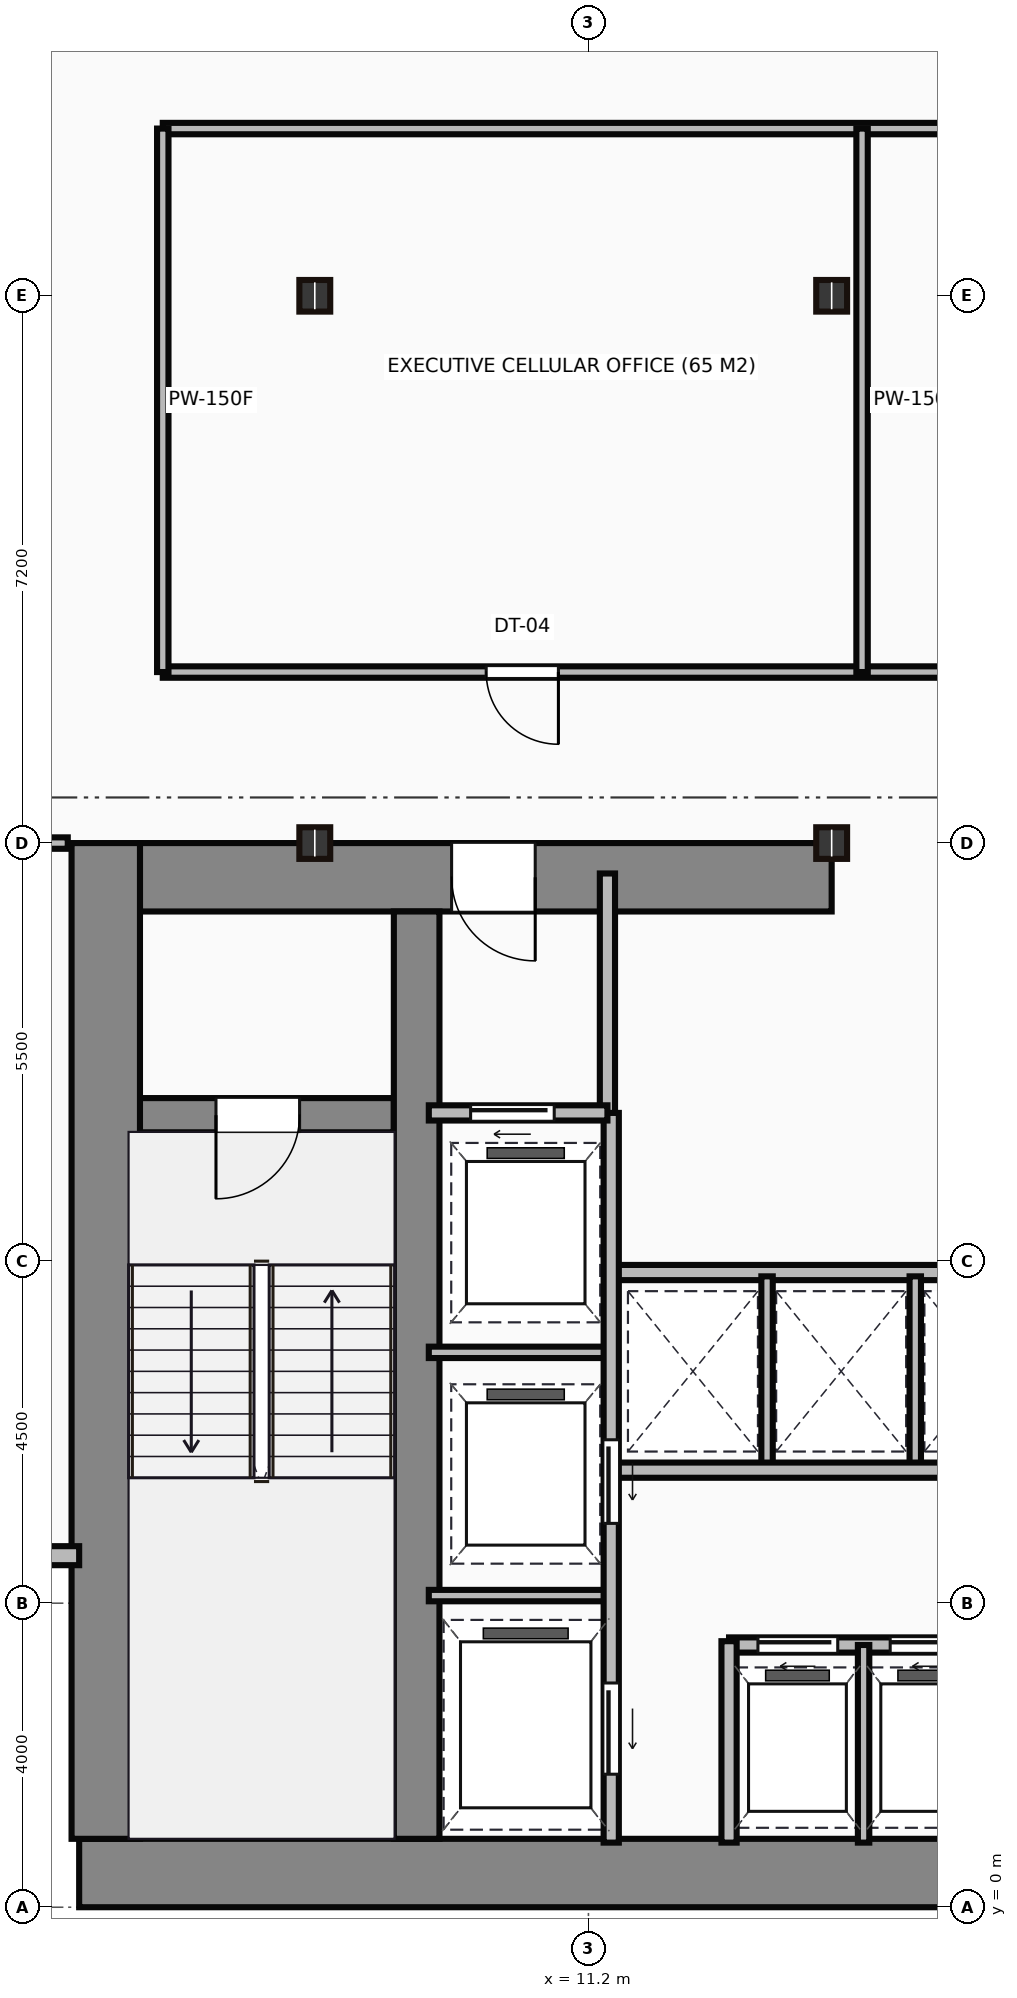
"""IFC4 building model, lengths in metres.
Left out: names, types, materials, properties, quantities, classifications, styles, units other than length and angle.
Written with IfcOpenShell. Run it as: python <this file> out.ifc"""

import sys

from ifc_helpers import new_model, si_unit, direction, frame, frame_2d, origin, origin_2d, place, context, subcontext, project, spatial, rectangle, i_section, extrude, source, transform, mapped, element, fill, save


model = new_model("IFC4")
c1 = context("Model", 3, precision=1e-05, world=origin(), true_north=direction((0.0, 1.0)))
c2 = subcontext(c1, "Body", "Model", "MODEL_VIEW")
j1 = project(units=[si_unit("LENGTHUNIT", "METRE"), si_unit("PLANEANGLEUNIT", "RADIAN")], contexts=[c1])
p1 = place(None, origin())
s1 = spatial("IfcSite", under=j1, at=p1, CompositionType="ELEMENT")
p2 = place(p1, origin())
s2 = spatial("IfcBuilding", under=s1, at=p2, CompositionType="ELEMENT")
p3 = place(p2, frame((0.0, 0.0, 50.75)))
s3 = spatial("IfcBuildingStorey", under=s2, at=p3, CompositionType="ELEMENT", Elevation=50.75)
m1 = source(origin(), c2, "Body", "SweptSolid", [
    extrude(rectangle(XDim=29.5, YDim=0.9, at=frame_2d((14.75, 0.0))), origin(), (0.0, 0.0, 1.0), 3.65),
])
p4 = place(p3, frame((4.5, 0.45, 0.0), z_axis=(0.0, 0.0, 1.0), x_axis=(1.0, 0.0, 0.0)))
e1 = element("IfcWall", 1, at=p4, inside=s3, PredefinedType="SHEAR", context=c2, shape_type="MappedRepresentation", body=[
    mapped(m1, transform((0.0, 0.0, 0.0))),
])
m2 = source(origin(), c2, "Body", "SweptSolid", [
    extrude(rectangle(XDim=13.1, YDim=0.9, at=frame_2d((6.55, 0.0))), origin(), (0.0, 0.0, 1.0), 3.65),
])
p5 = place(p3, frame((4.85, 0.9, 0.0), z_axis=(0.0, 0.0, 1.0), x_axis=(0.0, 1.0, 0.0)))
e2 = element("IfcWall", 2, at=p5, inside=s3, PredefinedType="SHEAR", context=c2, shape_type="MappedRepresentation", body=[
    mapped(m2, transform((0.0, 0.0, 0.0))),
])
m3 = source(origin(), c2, "Body", "SweptSolid", [
    extrude(rectangle(XDim=9.1, YDim=0.9, at=frame_2d((4.55, 0.0))), origin(), (0.0, 0.0, 1.0), 3.65),
])
p6 = place(p3, frame((5.3, 13.55, 0.0), z_axis=(0.0, 0.0, 1.0), x_axis=(1.0, 0.0, 0.0)))
e3 = element("IfcWall", 3, at=p6, inside=s3, PredefinedType="SHEAR", context=c2, shape_type="MappedRepresentation", body=[
    mapped(m3, transform((0.0, 0.0, 0.0))),
])
p7 = place(p6, frame((4.1, 0.0, 0.0)))
e4 = element("IfcOpeningElement", 4, at=p7, cuts=e3, PredefinedType="OPENING", context=c2, shape_type="SweptSolid", body=[
    extrude(rectangle(XDim=1.1, YDim=2.15, at=frame_2d((0.55, 1.075))), frame((0.0, 0.46, 0.0), z_axis=(0.0, -1.0, 0.0), x_axis=(1.0, 0.0, 0.0)), (0.0, 0.0, 1.0), 0.92),
])
m4 = source(origin(), c2, "Body", "SweptSolid", [
    extrude(rectangle(XDim=12.2, YDim=0.6, at=frame_2d((6.1, 0.0))), origin(), (0.0, 0.0, 1.0), 3.65),
])
p8 = place(p3, frame((8.94, 0.9, 0.0), z_axis=(0.0, 0.0, 1.0), x_axis=(0.0, 1.0, 0.0)))
e5 = element("IfcWall", 5, at=p8, inside=s3, PredefinedType="SHEAR", context=c2, shape_type="MappedRepresentation", body=[
    mapped(m4, transform((0.0, 0.0, 0.0))),
])
m5 = source(origin(), c2, "Body", "SweptSolid", [
    extrude(rectangle(XDim=3.39, YDim=0.45, at=frame_2d((1.695, 0.0))), origin(), (0.0, 0.0, 1.0), 3.65),
])
p9 = place(p3, frame((5.25, 10.42, 0.0), z_axis=(0.0, 0.0, 1.0), x_axis=(1.0, 0.0, 0.0)))
e6 = element("IfcWall", 6, at=p9, inside=s3, PredefinedType="SHEAR", context=c2, shape_type="MappedRepresentation", body=[
    mapped(m5, transform((0.0, 0.0, 0.0))),
])
p10 = place(p9, frame((1.05, 0.0, 0.0)))
e7 = element("IfcOpeningElement", 7, at=p10, cuts=e6, PredefinedType="OPENING", context=c2, shape_type="SweptSolid", body=[
    extrude(rectangle(XDim=1.1, YDim=2.15, at=frame_2d((0.55, 1.075))), frame((0.0, 0.235, 0.0), z_axis=(0.0, -1.0, 0.0), x_axis=(1.0, 0.0, 0.0)), (0.0, 0.0, 1.0), 0.47),
])
m6 = source(origin(), c2, "Body", "SweptSolid", [
    extrude(i_section(OverallWidth=0.406, OverallDepth=0.416, WebThickness=0.03, FlangeThickness=0.048, at=origin_2d()), origin(), (0.0, 0.0, 1.0), 3.65),
])
for number, where, z_axis, x_axis in (
    (8, (7.6, 14.0, 0.0), (0.0, 0.0, 1.0), (1.0, 0.0, 0.0)),
    (9, (7.6, 21.2, 0.0), (0.0, 0.0, 1.0), (1.0, 0.0, 0.0)),
    (10, (14.4, 14.0, 0.0), (0.0, 0.0, 1.0), (1.0, 0.0, 0.0)),
    (11, (14.4, 21.2, 0.0), (0.0, 0.0, 1.0), (1.0, 0.0, 0.0)),
):
    element("IfcColumn", number, at=place(p3, frame(where, z_axis=z_axis, x_axis=x_axis)), inside=s3, PredefinedType="COLUMN", context=c2, shape_type="MappedRepresentation", body=[
        mapped(m6, transform((0.0, 0.0, 0.0))),
    ])
m7 = source(origin(), c2, "Body", "SweptSolid", [
    extrude(rectangle(XDim=4.5, YDim=0.25, at=frame_2d((2.25, 0.0))), origin(), (0.0, 0.0, 1.0), 3.4),
])
p11 = place(p3, frame((0.0, 4.625, 0.0), z_axis=(0.0, 0.0, 1.0), x_axis=(1.0, 0.0, 0.0)))
e12 = element("IfcWall", 12, at=p11, inside=s3, PredefinedType="STANDARD", context=c2, shape_type="MappedRepresentation", body=[
    mapped(m7, transform((0.0, 0.0, 0.0))),
])
m8 = source(origin(), c2, "Body", "SweptSolid", [
    extrude(rectangle(XDim=3.18, YDim=0.2, at=frame_2d((1.59, 0.0))), origin(), (0.0, 0.0, 1.0), 3.4),
])
p12 = place(p3, frame((11.45, 10.42, 0.0), z_axis=(0.0, 0.0, 1.0), x_axis=(0.0, 1.0, 0.0)))
e13 = element("IfcWall", 13, at=p12, inside=s3, PredefinedType="PARTITIONING", context=c2, shape_type="MappedRepresentation", body=[
    mapped(m8, transform((0.0, 0.0, 0.0))),
])
m9 = source(origin(), c2, "Body", "SweptSolid", [
    extrude(rectangle(XDim=2.35, YDim=0.2, at=frame_2d((1.175, 0.0))), origin(), (0.0, 0.0, 1.0), 3.4),
])
p13 = place(p3, frame((9.1, 10.45, 0.0), z_axis=(0.0, 0.0, 1.0), x_axis=(1.0, 0.0, 0.0)))
e14 = element("IfcWall", 14, at=p13, inside=s3, PredefinedType="PARTITIONING", context=c2, shape_type="MappedRepresentation", body=[
    mapped(m9, transform((0.0, 0.0, 0.0))),
])
p14 = place(p13, frame((0.55, 0.0, 0.0)))
e15 = element("IfcOpeningElement", 15, at=p14, cuts=e14, PredefinedType="OPENING", context=c2, shape_type="SweptSolid", body=[
    extrude(rectangle(XDim=1.1, YDim=2.15, at=frame_2d((0.55, 1.075))), frame((0.0, 0.11, 0.0), z_axis=(0.0, -1.0, 0.0), x_axis=(1.0, 0.0, 0.0)), (0.0, 0.0, 1.0), 0.22),
])
m10 = source(origin(), c2, "Body", "SweptSolid", [
    extrude(rectangle(XDim=9.6, YDim=0.2, at=frame_2d((4.8, 0.0))), origin(), (0.0, 0.0, 1.0), 3.4),
])
p15 = place(p3, frame((11.5, 0.85, 0.0), z_axis=(0.0, 0.0, 1.0), x_axis=(0.0, 1.0, 0.0)))
e16 = element("IfcWall", 16, at=p15, inside=s3, PredefinedType="PARTITIONING", context=c2, shape_type="MappedRepresentation", body=[
    mapped(m10, transform((0.0, 0.0, 0.0))),
])
p16 = place(p15, frame((4.2, 0.0, 0.0)))
e17 = element("IfcOpeningElement", 17, at=p16, cuts=e16, PredefinedType="OPENING", context=c2, shape_type="SweptSolid", body=[
    extrude(rectangle(XDim=1.1, YDim=2.15, at=frame_2d((0.55, 1.075))), frame((0.0, 0.11, 0.0), z_axis=(0.0, -1.0, 0.0), x_axis=(1.0, 0.0, 0.0)), (0.0, 0.0, 1.0), 0.22),
])
p17 = place(p15, frame((0.9, 0.0, 0.0)))
e18 = element("IfcOpeningElement", 18, at=p17, cuts=e16, PredefinedType="OPENING", context=c2, shape_type="SweptSolid", body=[
    extrude(rectangle(XDim=1.2, YDim=2.15, at=frame_2d((0.6, 1.075))), frame((0.0, 0.11, 0.0), z_axis=(0.0, -1.0, 0.0), x_axis=(1.0, 0.0, 0.0)), (0.0, 0.0, 1.0), 0.22),
])
m11 = source(origin(), c2, "Body", "SweptSolid", [
    extrude(rectangle(XDim=2.4, YDim=0.15, at=frame_2d((1.2, 0.0))), origin(), (0.0, 0.0, 1.0), 3.4),
])
for number, where, z_axis, x_axis in (
    (19, (9.1, 4.1, 0.0), (0.0, 0.0, 1.0), (1.0, 0.0, 0.0)),
    (20, (9.1, 7.3, 0.0), (0.0, 0.0, 1.0), (1.0, 0.0, 0.0)),
):
    element("IfcWall", number, at=place(p3, frame(where, z_axis=z_axis, x_axis=x_axis)), inside=s3, PredefinedType="PARTITIONING", context=c2, shape_type="MappedRepresentation", body=[
        mapped(m11, transform((0.0, 0.0, 0.0))),
    ])
m12 = source(origin(), c2, "Body", "SweptSolid", [
    extrude(rectangle(XDim=2.65, YDim=0.2, at=frame_2d((1.325, 0.0))), origin(), (0.0, 0.0, 1.0), 3.4),
])
p18 = place(p3, frame((13.05, 0.85, 0.0), z_axis=(0.0, 0.0, 1.0), x_axis=(0.0, 1.0, 0.0)))
e21 = element("IfcWall", 21, at=p18, inside=s3, PredefinedType="PARTITIONING", context=c2, shape_type="MappedRepresentation", body=[
    mapped(m12, transform((0.0, 0.0, 0.0))),
])
m13 = source(origin(), c2, "Body", "SweptSolid", [
    extrude(rectangle(XDim=10.5, YDim=0.2, at=frame_2d((5.25, 0.0))), origin(), (0.0, 0.0, 1.0), 3.4),
])
p19 = place(p3, frame((13.05, 3.45, 0.0), z_axis=(0.0, 0.0, 1.0), x_axis=(1.0, 0.0, 0.0)))
e22 = element("IfcWall", 22, at=p19, inside=s3, PredefinedType="PARTITIONING", context=c2, shape_type="MappedRepresentation", body=[
    mapped(m13, transform((0.0, 0.0, 0.0))),
])
p20 = place(p19, frame((0.38, 0.0, 0.0)))
e23 = element("IfcOpeningElement", 23, at=p20, cuts=e22, PredefinedType="OPENING", context=c2, shape_type="SweptSolid", body=[
    extrude(rectangle(XDim=1.05, YDim=2.15, at=frame_2d((0.525, 1.075))), frame((0.0, 0.11, 0.0), z_axis=(0.0, -1.0, 0.0), x_axis=(1.0, 0.0, 0.0)), (0.0, 0.0, 1.0), 0.22),
])
p21 = place(p19, frame((2.12, 0.0, 0.0)))
e24 = element("IfcOpeningElement", 24, at=p21, cuts=e22, PredefinedType="OPENING", context=c2, shape_type="SweptSolid", body=[
    extrude(rectangle(XDim=1.05, YDim=2.15, at=frame_2d((0.525, 1.075))), frame((0.0, 0.11, 0.0), z_axis=(0.0, -1.0, 0.0), x_axis=(1.0, 0.0, 0.0)), (0.0, 0.0, 1.0), 0.22),
])
p22 = place(p19, frame((3.86, 0.0, 0.0)))
e25 = element("IfcOpeningElement", 25, at=p22, cuts=e22, PredefinedType="OPENING", context=c2, shape_type="SweptSolid", body=[
    extrude(rectangle(XDim=1.05, YDim=2.15, at=frame_2d((0.525, 1.075))), frame((0.0, 0.11, 0.0), z_axis=(0.0, -1.0, 0.0), x_axis=(1.0, 0.0, 0.0)), (0.0, 0.0, 1.0), 0.22),
])
p23 = place(p19, frame((5.6, 0.0, 0.0)))
e26 = element("IfcOpeningElement", 26, at=p23, cuts=e22, PredefinedType="OPENING", context=c2, shape_type="SweptSolid", body=[
    extrude(rectangle(XDim=1.05, YDim=2.15, at=frame_2d((0.525, 1.075))), frame((0.0, 0.11, 0.0), z_axis=(0.0, -1.0, 0.0), x_axis=(1.0, 0.0, 0.0)), (0.0, 0.0, 1.0), 0.22),
])
p24 = place(p19, frame((7.34, 0.0, 0.0)))
e27 = element("IfcOpeningElement", 27, at=p24, cuts=e22, PredefinedType="OPENING", context=c2, shape_type="SweptSolid", body=[
    extrude(rectangle(XDim=1.05, YDim=2.15, at=frame_2d((0.525, 1.075))), frame((0.0, 0.11, 0.0), z_axis=(0.0, -1.0, 0.0), x_axis=(1.0, 0.0, 0.0)), (0.0, 0.0, 1.0), 0.22),
])
p25 = place(p19, frame((9.08, 0.0, 0.0)))
e28 = element("IfcOpeningElement", 28, at=p25, cuts=e22, PredefinedType="OPENING", context=c2, shape_type="SweptSolid", body=[
    extrude(rectangle(XDim=1.05, YDim=2.15, at=frame_2d((0.525, 1.075))), frame((0.0, 0.11, 0.0), z_axis=(0.0, -1.0, 0.0), x_axis=(1.0, 0.0, 0.0)), (0.0, 0.0, 1.0), 0.22),
])
m14 = source(origin(), c2, "Body", "SweptSolid", [
    extrude(rectangle(XDim=2.6, YDim=0.15, at=frame_2d((1.3, 0.0))), origin(), (0.0, 0.0, 1.0), 3.4),
])
p26 = place(p3, frame((14.82, 0.85, 0.0), z_axis=(0.0, 0.0, 1.0), x_axis=(0.0, 1.0, 0.0)))
e29 = element("IfcWall", 29, at=p26, inside=s3, PredefinedType="PARTITIONING", context=c2, shape_type="MappedRepresentation", body=[
    mapped(m14, transform((0.0, 0.0, 0.0))),
])
m15 = source(origin(), c2, "Body", "SweptSolid", [
    extrude(rectangle(XDim=11.85, YDim=0.2, at=frame_2d((5.925, 0.0))), origin(), (0.0, 0.0, 1.0), 3.4),
])
for number, where, z_axis, x_axis in (
    (30, (11.55, 5.75, 0.0), (0.0, 0.0, 1.0), (1.0, 0.0, 0.0)),
    (31, (11.55, 8.35, 0.0), (0.0, 0.0, 1.0), (1.0, 0.0, 0.0)),
):
    element("IfcWall", number, at=place(p3, frame(where, z_axis=z_axis, x_axis=x_axis)), inside=s3, PredefinedType="PARTITIONING", context=c2, shape_type="MappedRepresentation", body=[
        mapped(m15, transform((0.0, 0.0, 0.0))),
    ])
m16 = source(origin(), c2, "Body", "SweptSolid", [
    extrude(rectangle(XDim=2.5, YDim=0.15, at=frame_2d((1.25, 0.0))), origin(), (0.0, 0.0, 1.0), 3.4),
])
for number, where, z_axis, x_axis in (
    (32, (13.55, 5.8, 0.0), (0.0, 0.0, 1.0), (0.0, 1.0, 0.0)),
    (33, (15.5, 5.8, 0.0), (0.0, 0.0, 1.0), (0.0, 1.0, 0.0)),
):
    element("IfcWall", number, at=place(p3, frame(where, z_axis=z_axis, x_axis=x_axis)), inside=s3, PredefinedType="PARTITIONING", context=c2, shape_type="MappedRepresentation", body=[
        mapped(m16, transform((0.0, 0.0, 0.0))),
    ])
m17 = source(origin(), c2, "Body", "SweptSolid", [
    extrude(rectangle(XDim=0.95, YDim=0.15, at=frame_2d((0.475, 0.0))), origin(), (0.0, 0.0, 1.0), 2.625),
])
p27 = place(p3, frame((4.35, 14.0, 0.0), z_axis=(0.0, 0.0, 1.0), x_axis=(-1.0, 0.0, 0.0)))
e34 = element("IfcWall", 34, at=p27, inside=s3, PredefinedType="PARTITIONING", context=c2, shape_type="MappedRepresentation", body=[
    mapped(m17, transform((0.0, 0.0, 0.0))),
])
m18 = source(origin(), c2, "Body", "SweptSolid", [
    extrude(rectangle(XDim=38.8, YDim=0.15, at=frame_2d((19.4, 0.0))), origin(), (0.0, 0.0, 1.0), 3.4),
])
p28 = place(p3, frame((5.6, 16.25, 0.0), z_axis=(0.0, 0.0, 1.0), x_axis=(1.0, 0.0, 0.0)))
e35 = element("IfcWall", 35, at=p28, inside=s3, PredefinedType="PARTITIONING", context=c2, shape_type="MappedRepresentation", body=[
    mapped(m18, transform((0.0, 0.0, 0.0))),
])
p29 = place(p28, frame((4.255, 0.0, 0.0)))
e36 = element("IfcOpeningElement", 36, at=p29, cuts=e35, PredefinedType="OPENING", context=c2, shape_type="SweptSolid", body=[
    extrude(rectangle(XDim=0.95, YDim=2.15, at=frame_2d((0.475, 1.075))), frame((0.0, 0.085, 0.0), z_axis=(0.0, -1.0, 0.0), x_axis=(1.0, 0.0, 0.0)), (0.0, 0.0, 1.0), 0.17),
])
p30 = place(p28, frame((14.125, 0.0, 0.0)))
e37 = element("IfcOpeningElement", 37, at=p30, cuts=e35, PredefinedType="OPENING", context=c2, shape_type="SweptSolid", body=[
    extrude(rectangle(XDim=0.95, YDim=2.15, at=frame_2d((0.475, 1.075))), frame((0.0, 0.085, 0.0), z_axis=(0.0, -1.0, 0.0), x_axis=(1.0, 0.0, 0.0)), (0.0, 0.0, 1.0), 0.17),
])
m19 = source(origin(), c2, "Body", "SweptSolid", [
    extrude(rectangle(XDim=38.8, YDim=0.15, at=frame_2d((19.4, 0.0))), origin(), (0.0, 0.0, 1.0), 2.978),
])
p31 = place(p3, frame((44.4, 23.4, 0.0), z_axis=(0.0, 0.0, 1.0), x_axis=(-1.0, 0.0, 0.0)))
e38 = element("IfcWall", 38, at=p31, inside=s3, PredefinedType="PARTITIONING", context=c2, shape_type="MappedRepresentation", body=[
    mapped(m19, transform((0.0, 0.0, 0.0))),
])
p32 = place(p31, frame((12.925, 0.0, 0.0)))
e39 = element("IfcOpeningElement", 39, at=p32, cuts=e38, PredefinedType="OPENING", context=c2, shape_type="SweptSolid", body=[
    extrude(rectangle(XDim=0.95, YDim=2.15, at=frame_2d((0.475, 1.075))), frame((0.0, 0.085, 0.0), z_axis=(0.0, -1.0, 0.0), x_axis=(1.0, 0.0, 0.0)), (0.0, 0.0, 1.0), 0.17),
])
p33 = place(p31, frame((3.655, 0.0, 0.0)))
e40 = element("IfcOpeningElement", 40, at=p33, cuts=e38, PredefinedType="OPENING", context=c2, shape_type="SweptSolid", body=[
    extrude(rectangle(XDim=0.95, YDim=2.15, at=frame_2d((0.475, 1.075))), frame((0.0, 0.085, 0.0), z_axis=(0.0, -1.0, 0.0), x_axis=(1.0, 0.0, 0.0)), (0.0, 0.0, 1.0), 0.17),
])
m20 = source(origin(), c2, "Body", "SweptSolid", [
    extrude(rectangle(XDim=7.15, YDim=0.15, at=frame_2d((3.575, 0.0))), origin(), (0.0, 0.0, 1.0), 3.4),
])
for number, where, z_axis, x_axis in (
    (41, (5.6, 23.4, 0.0), (0.0, 0.0, 1.0), (0.0, -1.0, 0.0)),
    (42, (14.8, 23.4, 0.0), (0.0, 0.0, 1.0), (0.0, -1.0, 0.0)),
):
    element("IfcWall", number, at=place(p3, frame(where, z_axis=z_axis, x_axis=x_axis)), inside=s3, PredefinedType="PARTITIONING", context=c2, shape_type="MappedRepresentation", body=[
        mapped(m20, transform((0.0, 0.0, 0.0))),
    ])
m21 = source(origin(), c2, "Body", "SweptSolid", [
    extrude(rectangle(XDim=1.1, YDim=2.15, at=frame_2d((0.55, 1.075))), frame((0.0, 0.025, 0.0), z_axis=(0.0, -1.0, 0.0), x_axis=(1.0, 0.0, 0.0)), (0.0, 0.0, 1.0), 0.05),
])
p34 = place(p10, frame((1.1, 0.0, 0.0), z_axis=(0.0, 0.0, 1.0), x_axis=(-1.0, 0.0, 0.0)))
e43 = element("IfcDoor", 43, at=p34, inside=s3, OperationType="SINGLE_SWING_LEFT", PredefinedType="DOOR", context=c2, shape_type="MappedRepresentation", body=[
    mapped(m21, transform((0.0, 0.0, 0.0))),
])
fill(e7, e43)
p35 = place(p7, origin())
e44 = element("IfcDoor", 44, at=p35, inside=s3, OperationType="SINGLE_SWING_RIGHT", PredefinedType="DOOR", context=c2, shape_type="MappedRepresentation", body=[
    mapped(m21, transform((0.0, 0.0, 0.0))),
])
fill(e4, e44)
p36 = place(p14, origin())
e45 = element("IfcDoor", 45, at=p36, inside=s3, OperationType="SLIDING_TO_LEFT", PredefinedType="DOOR", context=c2, shape_type="MappedRepresentation", body=[
    mapped(m21, transform((0.0, 0.0, 0.0))),
])
fill(e15, e45)
p37 = place(p16, frame((1.1, 0.0, 0.0), z_axis=(0.0, 0.0, 1.0), x_axis=(-1.0, 0.0, 0.0)))
e46 = element("IfcDoor", 46, at=p37, inside=s3, OperationType="SLIDING_TO_LEFT", PredefinedType="DOOR", context=c2, shape_type="MappedRepresentation", body=[
    mapped(m21, transform((0.0, 0.0, 0.0))),
])
fill(e17, e46)
m22 = source(origin(), c2, "Body", "SweptSolid", [
    extrude(rectangle(XDim=1.2, YDim=2.15, at=frame_2d((0.6, 1.075))), frame((0.0, 0.025, 0.0), z_axis=(0.0, -1.0, 0.0), x_axis=(1.0, 0.0, 0.0)), (0.0, 0.0, 1.0), 0.05),
])
p38 = place(p17, frame((1.2, 0.0, 0.0), z_axis=(0.0, 0.0, 1.0), x_axis=(-1.0, 0.0, 0.0)))
e47 = element("IfcDoor", 47, at=p38, inside=s3, OperationType="SLIDING_TO_LEFT", PredefinedType="DOOR", context=c2, shape_type="MappedRepresentation", body=[
    mapped(m22, transform((0.0, 0.0, 0.0))),
])
fill(e18, e47)
m23 = source(origin(), c2, "Body", "SweptSolid", [
    extrude(rectangle(XDim=1.05, YDim=2.15, at=frame_2d((0.525, 1.075))), frame((0.0, 0.025, 0.0), z_axis=(0.0, -1.0, 0.0), x_axis=(1.0, 0.0, 0.0)), (0.0, 0.0, 1.0), 0.05),
])
p39 = place(p20, origin())
e48 = element("IfcDoor", 48, at=p39, inside=s3, OperationType="SLIDING_TO_LEFT", PredefinedType="DOOR", context=c2, shape_type="MappedRepresentation", body=[
    mapped(m23, transform((0.0, 0.0, 0.0))),
])
fill(e23, e48)
p40 = place(p21, origin())
e49 = element("IfcDoor", 49, at=p40, inside=s3, OperationType="SLIDING_TO_LEFT", PredefinedType="DOOR", context=c2, shape_type="MappedRepresentation", body=[
    mapped(m23, transform((0.0, 0.0, 0.0))),
])
fill(e24, e49)
m24 = source(origin(), c2, "Body", "SweptSolid", [
    extrude(rectangle(XDim=0.95, YDim=2.15, at=frame_2d((0.475, 1.075))), frame((0.0, 0.025, 0.0), z_axis=(0.0, -1.0, 0.0), x_axis=(1.0, 0.0, 0.0)), (0.0, 0.0, 1.0), 0.05),
])
p41 = place(p29, origin())
e50 = element("IfcDoor", 50, at=p41, inside=s3, OperationType="SINGLE_SWING_RIGHT", PredefinedType="DOOR", context=c2, shape_type="MappedRepresentation", body=[
    mapped(m24, transform((0.0, 0.0, 0.0))),
])
fill(e36, e50)
save(model, sys.argv[1])
